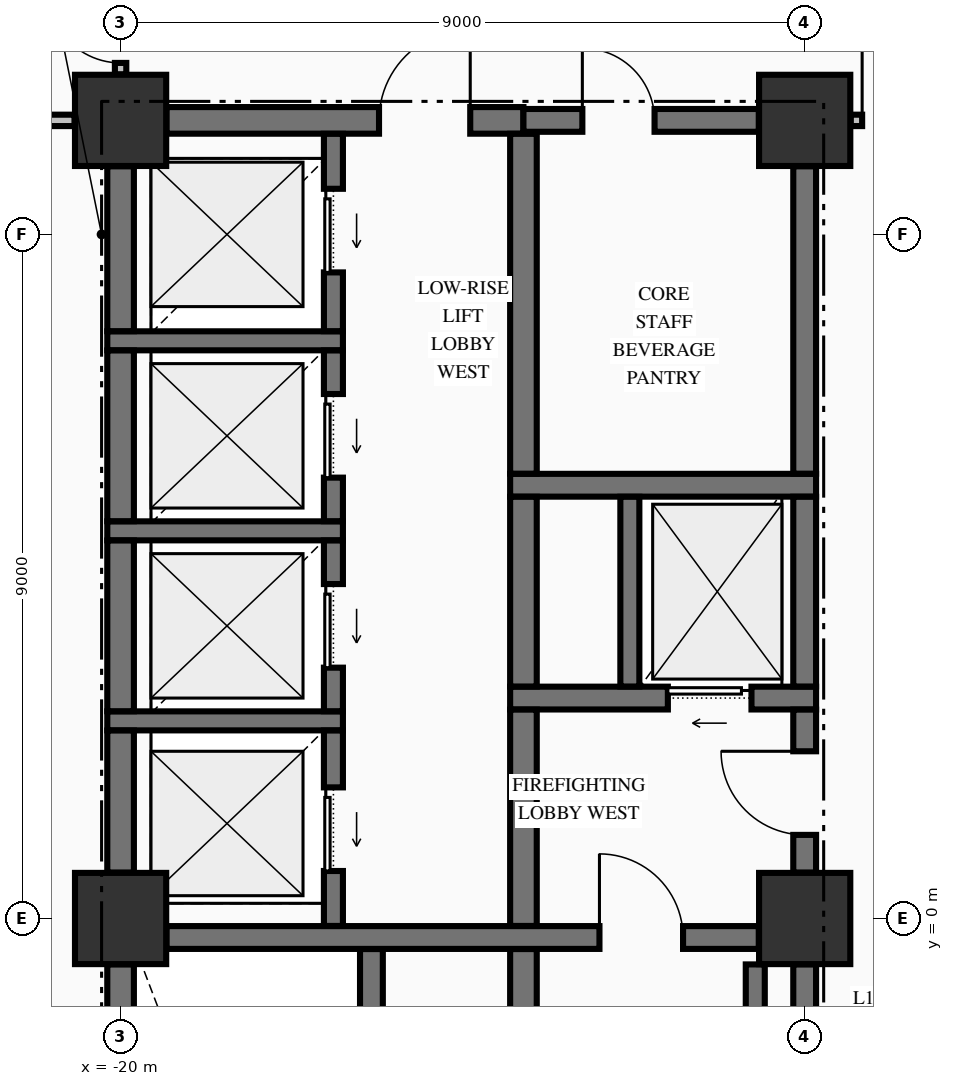
"""IFC4 building model, lengths in metres.
Left out: names, types, materials, properties, quantities, classifications, styles, units other than length and angle.
Written with IfcOpenShell. Run it as: python <this file> out.ifc"""

import sys

from ifc_helpers import new_model, si_unit, direction, frame, frame_2d, origin, origin_2d, place, context, subcontext, project, spatial, rectangle, extrude, element, fill, save


model = new_model("IFC4")
c1 = context("Model", 3, precision=1e-05, world=origin(), true_north=direction((0.0, 1.0)))
c2 = subcontext(c1, "Body", "Model", "MODEL_VIEW")
j1 = project(units=[si_unit("LENGTHUNIT", "METRE"), si_unit("PLANEANGLEUNIT", "RADIAN")], contexts=[c1])
p1 = place(None, origin())
s1 = spatial("IfcSite", under=j1, at=p1, CompositionType="ELEMENT")
p2 = place(p1, origin())
s2 = spatial("IfcBuilding", under=s1, at=p2, CompositionType="ELEMENT")
p3 = place(p2, frame((0.0, 0.0, 75.04)))
s3 = spatial("IfcBuildingStorey", under=s2, at=p3, CompositionType="ELEMENT", Elevation=75.04)
for number, where, z_axis, x_axis in (
    (1, (-20.0, 10.5, -0.25), (0.0, 0.0, 1.0), (1.0, 0.0, 0.0)),
    (2, (-11.0, 0.0, -0.25), (0.0, 0.0, 1.0), (1.0, 0.0, 0.0)),
    (3, (-11.0, 10.5, -0.25), (0.0, 0.0, 1.0), (1.0, 0.0, 0.0)),
    (4, (-20.0, 0.0, -0.25), (0.0, 0.0, 1.0), (1.0, 0.0, 0.0)),
):
    element("IfcColumn", number, at=place(p3, frame(where, z_axis=z_axis, x_axis=x_axis)), inside=s3, PredefinedType="COLUMN", context=c2, shape_type="SweptSolid", body=[
        extrude(rectangle(XDim=1.2, YDim=1.2, at=origin_2d()), origin(), (0.0, 0.0, 1.0), 3.57),
    ])
p4 = place(p3, frame((-19.396, -0.25, 0.0), z_axis=(0.0, 0.0, 1.0), x_axis=(1.0, 0.0, 0.0)))
e5 = element("IfcWall", 5, at=p4, inside=s3, PredefinedType="SHEAR", context=c2, shape_type="SweptSolid", body=[
    extrude(rectangle(XDim=7.792, YDim=0.3, at=frame_2d((3.896, 0.0))), origin(), (0.0, 0.0, 1.0), 3.32),
])
p5 = place(p4, frame((5.696, 0.0, 0.0)))
e6 = element("IfcOpeningElement", 6, at=p5, cuts=e5, PredefinedType="OPENING", context=c2, shape_type="SweptSolid", body=[
    extrude(rectangle(XDim=1.1, YDim=2.15, at=frame_2d((0.55, 1.075))), frame((0.0, 0.16, 0.0), z_axis=(0.0, -1.0, 0.0), x_axis=(1.0, 0.0, 0.0)), (0.0, 0.0, 1.0), 0.32),
])
p6 = place(p3, frame((-20.175, 2.6, 0.0), z_axis=(0.0, 0.0, 1.0), x_axis=(1.0, 0.0, 0.0)))
e7 = element("IfcWall", 7, at=p6, inside=s3, PredefinedType="SOLIDWALL", context=c2, shape_type="SweptSolid", body=[
    extrude(rectangle(XDim=3.1, YDim=0.25, at=frame_2d((1.55, 0.0))), origin(), (0.0, 0.0, 1.0), 3.32),
])
p7 = place(p3, frame((-14.875, 2.9, 0.0), z_axis=(0.0, 0.0, 1.0), x_axis=(1.0, 0.0, 0.0)))
e8 = element("IfcWall", 8, at=p7, inside=s3, PredefinedType="SHEAR", context=c2, shape_type="SweptSolid", body=[
    extrude(rectangle(XDim=4.025, YDim=0.3, at=frame_2d((2.012, 0.0))), origin(), (0.0, 0.0, 1.0), 3.32),
])
p8 = place(p7, frame((2.075, 0.0, 0.0)))
e9 = element("IfcOpeningElement", 9, at=p8, cuts=e8, PredefinedType="OPENING", context=c2, shape_type="SweptSolid", body=[
    extrude(rectangle(XDim=1.1, YDim=2.2, at=frame_2d((0.55, 1.1))), frame((0.0, 0.16, 0.0), z_axis=(0.0, -1.0, 0.0), x_axis=(1.0, 0.0, 0.0)), (0.0, 0.0, 1.0), 0.32),
])
p9 = place(p3, frame((-20.175, 5.1, 0.0), z_axis=(0.0, 0.0, 1.0), x_axis=(1.0, 0.0, 0.0)))
e10 = element("IfcWall", 10, at=p9, inside=s3, PredefinedType="SOLIDWALL", context=c2, shape_type="SweptSolid", body=[
    extrude(rectangle(XDim=3.1, YDim=0.25, at=frame_2d((1.55, 0.0))), origin(), (0.0, 0.0, 1.0), 3.32),
])
p10 = place(p3, frame((-14.875, 5.7, 0.0), z_axis=(0.0, 0.0, 1.0), x_axis=(1.0, 0.0, 0.0)))
e11 = element("IfcWall", 11, at=p10, inside=s3, PredefinedType="SHEAR", context=c2, shape_type="SweptSolid", body=[
    extrude(rectangle(XDim=4.025, YDim=0.3, at=frame_2d((2.012, 0.0))), origin(), (0.0, 0.0, 1.0), 3.32),
])
p11 = place(p3, frame((-20.175, 7.6, 0.0), z_axis=(0.0, 0.0, 1.0), x_axis=(1.0, 0.0, 0.0)))
e12 = element("IfcWall", 12, at=p11, inside=s3, PredefinedType="SOLIDWALL", context=c2, shape_type="SweptSolid", body=[
    extrude(rectangle(XDim=3.1, YDim=0.25, at=frame_2d((1.55, 0.0))), origin(), (0.0, 0.0, 1.0), 3.32),
])
p12 = place(p3, frame((-19.396, 10.5, 0.0), z_axis=(0.0, 0.0, 1.0), x_axis=(1.0, 0.0, 0.0)))
e13 = element("IfcWall", 13, at=p12, inside=s3, PredefinedType="SHEAR", context=c2, shape_type="SweptSolid", body=[
    extrude(rectangle(XDim=4.696, YDim=0.35, at=frame_2d((2.348, 0.0))), origin(), (0.0, 0.0, 1.0), 3.32),
])
p13 = place(p12, frame((2.796, 0.0, 0.0)))
e14 = element("IfcOpeningElement", 14, at=p13, cuts=e13, PredefinedType="OPENING", context=c2, shape_type="SweptSolid", body=[
    extrude(rectangle(XDim=1.2, YDim=2.15, at=frame_2d((0.6, 1.075))), frame((0.0, 0.185, 0.0), z_axis=(0.0, -1.0, 0.0), x_axis=(1.0, 0.0, 0.0)), (0.0, 0.0, 1.0), 0.37),
])
p14 = place(p3, frame((-14.7, 10.5, 0.0), z_axis=(0.0, 0.0, 1.0), x_axis=(1.0, 0.0, 0.0)))
e15 = element("IfcWall", 15, at=p14, inside=s3, PredefinedType="SHEAR", context=c2, shape_type="SweptSolid", body=[
    extrude(rectangle(XDim=3.096, YDim=0.3, at=frame_2d((1.548, 0.0))), origin(), (0.0, 0.0, 1.0), 3.32),
])
p15 = place(p14, frame((0.775, 0.0, 0.0)))
e16 = element("IfcOpeningElement", 16, at=p15, cuts=e15, PredefinedType="OPENING", context=c2, shape_type="SweptSolid", body=[
    extrude(rectangle(XDim=0.95, YDim=2.15, at=frame_2d((0.475, 1.075))), frame((0.0, 0.16, 0.0), z_axis=(0.0, -1.0, 0.0), x_axis=(1.0, 0.0, 0.0)), (0.0, 0.0, 1.0), 0.32),
])
p16 = place(p3, frame((-28.835, 10.5, 0.0), z_axis=(0.0, 0.0, 1.0), x_axis=(1.0, 0.0, 0.0)))
e17 = element("IfcWall", 17, at=p16, inside=s3, PredefinedType="PARTITIONING", context=c2, shape_type="SweptSolid", body=[
    extrude(rectangle(XDim=8.229, YDim=0.15, at=frame_2d((4.115, 0.0))), origin(), (0.0, 0.0, 1.0), 3.32),
])
p17 = place(p16, frame((3.835, 0.0, 0.0)))
e18 = element("IfcOpeningElement", 18, at=p17, cuts=e17, PredefinedType="OPENING", context=c2, shape_type="SweptSolid", body=[
    extrude(rectangle(XDim=1.0, YDim=2.15, at=frame_2d((0.5, 1.075))), frame((0.0, 0.085, 0.0), z_axis=(0.0, -1.0, 0.0), x_axis=(1.0, 0.0, 0.0)), (0.0, 0.0, 1.0), 0.17),
])
p18 = place(p3, frame((-10.394, 10.5, 0.0), z_axis=(0.0, 0.0, 1.0), x_axis=(1.0, 0.0, 0.0)))
e19 = element("IfcWall", 19, at=p18, inside=s3, PredefinedType="PARTITIONING", context=c2, shape_type="SweptSolid", body=[
    extrude(rectangle(XDim=20.788, YDim=0.15, at=frame_2d((10.394, 0.0))), origin(), (0.0, 0.0, 1.0), 3.32),
])
p19 = place(p18, frame((0.15, 0.0, 0.0)))
e20 = element("IfcOpeningElement", 20, at=p19, cuts=e19, PredefinedType="OPENING", context=c2, shape_type="SweptSolid", body=[
    extrude(rectangle(XDim=1.05, YDim=2.15, at=frame_2d((0.525, 1.075))), frame((0.0, 0.085, 0.0), z_axis=(0.0, -1.0, 0.0), x_axis=(1.0, 0.0, 0.0)), (0.0, 0.0, 1.0), 0.17),
])
p20 = place(p18, frame((19.588, 0.0, 0.0)))
e21 = element("IfcOpeningElement", 21, at=p20, cuts=e19, PredefinedType="OPENING", context=c2, shape_type="SweptSolid", body=[
    extrude(rectangle(XDim=1.05, YDim=2.15, at=frame_2d((0.525, 1.075))), frame((0.0, 0.085, 0.0), z_axis=(0.0, -1.0, 0.0), x_axis=(1.0, 0.0, 0.0)), (0.0, 0.0, 1.0), 0.17),
])
p21 = place(p3, frame((-20.0, -9.346, 0.0), z_axis=(0.0, 0.0, 1.0), x_axis=(0.0, 1.0, 0.0)))
e22 = element("IfcWall", 22, at=p21, inside=s3, PredefinedType="SHEAR", context=c2, shape_type="SweptSolid", body=[
    extrude(rectangle(XDim=8.742, YDim=0.35, at=frame_2d((4.371, 0.0))), origin(), (0.0, 0.0, 1.0), 3.32),
])
p22 = place(p3, frame((-20.0, 0.604, 0.0), z_axis=(0.0, 0.0, 1.0), x_axis=(0.0, 1.0, 0.0)))
e23 = element("IfcWall", 23, at=p22, inside=s3, PredefinedType="SHEAR", context=c2, shape_type="SweptSolid", body=[
    extrude(rectangle(XDim=1.869, YDim=0.35, at=frame_2d((0.935, 0.0))), origin(), (0.0, 0.0, 1.0), 3.32),
])
for number, where, z_axis, x_axis in (
    (24, (-20.0, 2.727, 0.0), (0.0, 0.0, 1.0), (0.0, 1.0, 0.0)),
    (25, (-20.0, 5.227, 0.0), (0.0, 0.0, 1.0), (0.0, 1.0, 0.0)),
):
    element("IfcWall", number, at=place(p3, frame(where, z_axis=z_axis, x_axis=x_axis)), inside=s3, PredefinedType="SHEAR", context=c2, shape_type="SweptSolid", body=[
        extrude(rectangle(XDim=2.246, YDim=0.35, at=frame_2d((1.123, 0.0))), origin(), (0.0, 0.0, 1.0), 3.32),
    ])
p23 = place(p3, frame((-20.0, 7.727, 0.0), z_axis=(0.0, 0.0, 1.0), x_axis=(0.0, 1.0, 0.0)))
e26 = element("IfcWall", 26, at=p23, inside=s3, PredefinedType="SHEAR", context=c2, shape_type="SweptSolid", body=[
    extrude(rectangle(XDim=2.169, YDim=0.35, at=frame_2d((1.084, 0.0))), origin(), (0.0, 0.0, 1.0), 3.32),
])
p24 = place(p3, frame((-17.2, -0.098, 0.0), z_axis=(0.0, 0.0, 1.0), x_axis=(0.0, 1.0, 0.0)))
e27 = element("IfcWall", 27, at=p24, inside=s3, PredefinedType="SOLIDWALL", context=c2, shape_type="SweptSolid", body=[
    extrude(rectangle(XDim=2.571, YDim=0.25, at=frame_2d((1.285, 0.0))), origin(), (0.0, 0.0, 1.0), 3.32),
])
p25 = place(p24, frame((0.723, 0.0, 0.0)))
e28 = element("IfcOpeningElement", 28, at=p25, cuts=e27, PredefinedType="OPENING", context=c2, shape_type="SweptSolid", body=[
    extrude(rectangle(XDim=1.1, YDim=2.2, at=frame_2d((0.55, 1.1))), frame((0.0, 0.135, 0.0), z_axis=(0.0, -1.0, 0.0), x_axis=(1.0, 0.0, 0.0)), (0.0, 0.0, 1.0), 0.27),
])
p26 = place(p3, frame((-17.2, 2.727, 0.0), z_axis=(0.0, 0.0, 1.0), x_axis=(0.0, 1.0, 0.0)))
e29 = element("IfcWall", 29, at=p26, inside=s3, PredefinedType="SOLIDWALL", context=c2, shape_type="SweptSolid", body=[
    extrude(rectangle(XDim=2.246, YDim=0.25, at=frame_2d((1.123, 0.0))), origin(), (0.0, 0.0, 1.0), 3.32),
])
p27 = place(p26, frame((0.573, 0.0, 0.0)))
e30 = element("IfcOpeningElement", 30, at=p27, cuts=e29, PredefinedType="OPENING", context=c2, shape_type="SweptSolid", body=[
    extrude(rectangle(XDim=1.1, YDim=2.2, at=frame_2d((0.55, 1.1))), frame((0.0, 0.135, 0.0), z_axis=(0.0, -1.0, 0.0), x_axis=(1.0, 0.0, 0.0)), (0.0, 0.0, 1.0), 0.27),
])
p28 = place(p3, frame((-17.2, 5.227, 0.0), z_axis=(0.0, 0.0, 1.0), x_axis=(0.0, 1.0, 0.0)))
e31 = element("IfcWall", 31, at=p28, inside=s3, PredefinedType="SOLIDWALL", context=c2, shape_type="SweptSolid", body=[
    extrude(rectangle(XDim=2.246, YDim=0.25, at=frame_2d((1.123, 0.0))), origin(), (0.0, 0.0, 1.0), 3.32),
])
p29 = place(p28, frame((0.573, 0.0, 0.0)))
e32 = element("IfcOpeningElement", 32, at=p29, cuts=e31, PredefinedType="OPENING", context=c2, shape_type="SweptSolid", body=[
    extrude(rectangle(XDim=1.1, YDim=2.2, at=frame_2d((0.55, 1.1))), frame((0.0, 0.135, 0.0), z_axis=(0.0, -1.0, 0.0), x_axis=(1.0, 0.0, 0.0)), (0.0, 0.0, 1.0), 0.27),
])
p30 = place(p3, frame((-17.2, 7.727, 0.0), z_axis=(0.0, 0.0, 1.0), x_axis=(0.0, 1.0, 0.0)))
e33 = element("IfcWall", 33, at=p30, inside=s3, PredefinedType="SOLIDWALL", context=c2, shape_type="SweptSolid", body=[
    extrude(rectangle(XDim=2.596, YDim=0.25, at=frame_2d((1.298, 0.0))), origin(), (0.0, 0.0, 1.0), 3.32),
])
p31 = place(p30, frame((0.773, 0.0, 0.0)))
e34 = element("IfcOpeningElement", 34, at=p31, cuts=e33, PredefinedType="OPENING", context=c2, shape_type="SweptSolid", body=[
    extrude(rectangle(XDim=1.1, YDim=2.2, at=frame_2d((0.55, 1.1))), frame((0.0, 0.135, 0.0), z_axis=(0.0, -1.0, 0.0), x_axis=(1.0, 0.0, 0.0)), (0.0, 0.0, 1.0), 0.27),
])
p32 = place(p3, frame((-16.7, -9.773, 0.0), z_axis=(0.0, 0.0, 1.0), x_axis=(0.0, 1.0, 0.0)))
e35 = element("IfcWall", 35, at=p32, inside=s3, PredefinedType="SHEAR", context=c2, shape_type="SweptSolid", body=[
    extrude(rectangle(XDim=9.371, YDim=0.3, at=frame_2d((4.686, 0.0))), origin(), (0.0, 0.0, 1.0), 3.32),
])
p33 = place(p3, frame((-14.7, -9.773, 0.0), z_axis=(0.0, 0.0, 1.0), x_axis=(0.0, 1.0, 0.0)))
e36 = element("IfcWall", 36, at=p33, inside=s3, PredefinedType="SHEAR", context=c2, shape_type="SweptSolid", body=[
    extrude(rectangle(XDim=9.371, YDim=0.35, at=frame_2d((4.686, 0.0))), origin(), (0.0, 0.0, 1.0), 3.32),
])
p34 = place(p3, frame((-14.7, -0.098, 0.0), z_axis=(0.0, 0.0, 1.0), x_axis=(0.0, 1.0, 0.0)))
e37 = element("IfcWall", 37, at=p34, inside=s3, PredefinedType="SHEAR", context=c2, shape_type="SweptSolid", body=[
    extrude(rectangle(XDim=2.846, YDim=0.35, at=frame_2d((1.423, 0.0))), origin(), (0.0, 0.0, 1.0), 3.32),
])
p35 = place(p3, frame((-14.7, 3.052, 0.0), z_axis=(0.0, 0.0, 1.0), x_axis=(0.0, 1.0, 0.0)))
e38 = element("IfcWall", 38, at=p35, inside=s3, PredefinedType="SHEAR", context=c2, shape_type="SweptSolid", body=[
    extrude(rectangle(XDim=2.496, YDim=0.35, at=frame_2d((1.248, 0.0))), origin(), (0.0, 0.0, 1.0), 3.32),
])
p36 = place(p3, frame((-14.7, 5.852, 0.0), z_axis=(0.0, 0.0, 1.0), x_axis=(0.0, 1.0, 0.0)))
e39 = element("IfcWall", 39, at=p36, inside=s3, PredefinedType="SHEAR", context=c2, shape_type="SweptSolid", body=[
    extrude(rectangle(XDim=4.471, YDim=0.35, at=frame_2d((2.235, 0.0))), origin(), (0.0, 0.0, 1.0), 3.32),
])
p37 = place(p3, frame((-13.3, 3.052, 0.0), z_axis=(0.0, 0.0, 1.0), x_axis=(0.0, 1.0, 0.0)))
e40 = element("IfcWall", 40, at=p37, inside=s3, PredefinedType="SOLIDWALL", context=c2, shape_type="SweptSolid", body=[
    extrude(rectangle(XDim=2.496, YDim=0.25, at=frame_2d((1.248, 0.0))), origin(), (0.0, 0.0, 1.0), 3.32),
])
p38 = place(p3, frame((-11.65, -9.346, 0.0), z_axis=(0.0, 0.0, 1.0), x_axis=(0.0, 1.0, 0.0)))
e41 = element("IfcWall", 41, at=p38, inside=s3, PredefinedType="SOLIDWALL", context=c2, shape_type="SweptSolid", body=[
    extrude(rectangle(XDim=8.742, YDim=0.25, at=frame_2d((4.371, 0.0))), origin(), (0.0, 0.0, 1.0), 3.32),
])
p39 = place(p3, frame((-11.0, -9.346, 0.0), z_axis=(0.0, 0.0, 1.0), x_axis=(0.0, 1.0, 0.0)))
e42 = element("IfcWall", 42, at=p39, inside=s3, PredefinedType="SHEAR", context=c2, shape_type="SweptSolid", body=[
    extrude(rectangle(XDim=8.742, YDim=0.3, at=frame_2d((4.371, 0.0))), origin(), (0.0, 0.0, 1.0), 3.32),
])
p40 = place(p3, frame((-11.0, 0.604, 0.0), z_axis=(0.0, 0.0, 1.0), x_axis=(0.0, 1.0, 0.0)))
e43 = element("IfcWall", 43, at=p40, inside=s3, PredefinedType="SHEAR", context=c2, shape_type="SweptSolid", body=[
    extrude(rectangle(XDim=2.144, YDim=0.3, at=frame_2d((1.072, 0.0))), origin(), (0.0, 0.0, 1.0), 3.32),
])
p41 = place(p40, frame((0.496, 0.0, 0.0)))
e44 = element("IfcOpeningElement", 44, at=p41, cuts=e43, PredefinedType="OPENING", context=c2, shape_type="SweptSolid", body=[
    extrude(rectangle(XDim=1.1, YDim=2.15, at=frame_2d((0.55, 1.075))), frame((0.0, 0.16, 0.0), z_axis=(0.0, -1.0, 0.0), x_axis=(1.0, 0.0, 0.0)), (0.0, 0.0, 1.0), 0.32),
])
p42 = place(p3, frame((-11.0, 3.052, 0.0), z_axis=(0.0, 0.0, 1.0), x_axis=(0.0, 1.0, 0.0)))
e45 = element("IfcWall", 45, at=p42, inside=s3, PredefinedType="SHEAR", context=c2, shape_type="SweptSolid", body=[
    extrude(rectangle(XDim=2.496, YDim=0.3, at=frame_2d((1.248, 0.0))), origin(), (0.0, 0.0, 1.0), 3.32),
])
p43 = place(p3, frame((-11.0, 5.852, 0.0), z_axis=(0.0, 0.0, 1.0), x_axis=(0.0, 1.0, 0.0)))
e46 = element("IfcWall", 46, at=p43, inside=s3, PredefinedType="SHEAR", context=c2, shape_type="SweptSolid", body=[
    extrude(rectangle(XDim=4.044, YDim=0.3, at=frame_2d((2.022, 0.0))), origin(), (0.0, 0.0, 1.0), 3.32),
])
p44 = place(p3, frame((-20.0, 11.106, 0.0), z_axis=(0.0, 0.0, 1.0), x_axis=(0.0, 1.0, 0.0)))
e47 = element("IfcWall", 47, at=p44, inside=s3, PredefinedType="PARTITIONING", context=c2, shape_type="SweptSolid", body=[
    extrude(rectangle(XDim=1.366, YDim=0.15, at=frame_2d((0.683, 0.0))), origin(), (0.0, 0.0, 1.0), 2.66),
])
p45 = place(p44, frame((0.15, 0.0, 0.0)))
e48 = element("IfcOpeningElement", 48, at=p45, cuts=e47, PredefinedType="OPENING", context=c2, shape_type="SweptSolid", body=[
    extrude(rectangle(XDim=0.95, YDim=2.15, at=frame_2d((0.475, 1.075))), frame((0.0, 0.085, 0.0), z_axis=(0.0, -1.0, 0.0), x_axis=(1.0, 0.0, 0.0)), (0.0, 0.0, 1.0), 0.17),
])
p46 = place(p5, origin())
e49 = element("IfcDoor", 49, at=p46, inside=s3, OperationType="SINGLE_SWING_LEFT", PredefinedType="DOOR", context=c2, shape_type="SweptSolid", body=[
    extrude(rectangle(XDim=1.1, YDim=2.15, at=frame_2d((0.55, 1.075))), frame((0.0, 0.025, 0.0), z_axis=(0.0, -1.0, 0.0), x_axis=(1.0, 0.0, 0.0)), (0.0, 0.0, 1.0), 0.05),
])
fill(e6, e49)
p47 = place(p41, origin())
e50 = element("IfcDoor", 50, at=p47, inside=s3, OperationType="SINGLE_SWING_RIGHT", PredefinedType="DOOR", context=c2, shape_type="SweptSolid", body=[
    extrude(rectangle(XDim=1.1, YDim=2.15, at=frame_2d((0.55, 1.075))), frame((0.0, 0.025, 0.0), z_axis=(0.0, -1.0, 0.0), x_axis=(1.0, 0.0, 0.0)), (0.0, 0.0, 1.0), 0.05),
])
fill(e44, e50)
p48 = place(p8, origin())
e51 = element("IfcDoor", 51, at=p48, inside=s3, OperationType="SLIDING_TO_LEFT", PredefinedType="DOOR", context=c2, shape_type="SweptSolid", body=[
    extrude(rectangle(XDim=1.1, YDim=2.2, at=frame_2d((0.55, 1.1))), frame((0.0, 0.025, 0.0), z_axis=(0.0, -1.0, 0.0), x_axis=(1.0, 0.0, 0.0)), (0.0, 0.0, 1.0), 0.05),
])
fill(e9, e51)
p49 = place(p15, origin())
e52 = element("IfcDoor", 52, at=p49, inside=s3, OperationType="SINGLE_SWING_LEFT", PredefinedType="DOOR", context=c2, shape_type="SweptSolid", body=[
    extrude(rectangle(XDim=0.95, YDim=2.15, at=frame_2d((0.475, 1.075))), frame((0.0, 0.025, 0.0), z_axis=(0.0, -1.0, 0.0), x_axis=(1.0, 0.0, 0.0)), (0.0, 0.0, 1.0), 0.05),
])
fill(e16, e52)
p50 = place(p13, origin())
e53 = element("IfcDoor", 53, at=p50, inside=s3, OperationType="SINGLE_SWING_RIGHT", PredefinedType="DOOR", context=c2, shape_type="SweptSolid", body=[
    extrude(rectangle(XDim=1.2, YDim=2.15, at=frame_2d((0.6, 1.075))), frame((0.0, 0.025, 0.0), z_axis=(0.0, -1.0, 0.0), x_axis=(1.0, 0.0, 0.0)), (0.0, 0.0, 1.0), 0.05),
])
fill(e14, e53)
p51 = place(p25, origin())
e54 = element("IfcDoor", 54, at=p51, inside=s3, OperationType="SLIDING_TO_LEFT", PredefinedType="DOOR", context=c2, shape_type="SweptSolid", body=[
    extrude(rectangle(XDim=1.1, YDim=2.2, at=frame_2d((0.55, 1.1))), frame((0.0, 0.025, 0.0), z_axis=(0.0, -1.0, 0.0), x_axis=(1.0, 0.0, 0.0)), (0.0, 0.0, 1.0), 0.05),
])
fill(e28, e54)
p52 = place(p27, origin())
e55 = element("IfcDoor", 55, at=p52, inside=s3, OperationType="SLIDING_TO_LEFT", PredefinedType="DOOR", context=c2, shape_type="SweptSolid", body=[
    extrude(rectangle(XDim=1.1, YDim=2.2, at=frame_2d((0.55, 1.1))), frame((0.0, 0.025, 0.0), z_axis=(0.0, -1.0, 0.0), x_axis=(1.0, 0.0, 0.0)), (0.0, 0.0, 1.0), 0.05),
])
fill(e30, e55)
p53 = place(p29, origin())
e56 = element("IfcDoor", 56, at=p53, inside=s3, OperationType="SLIDING_TO_LEFT", PredefinedType="DOOR", context=c2, shape_type="SweptSolid", body=[
    extrude(rectangle(XDim=1.1, YDim=2.2, at=frame_2d((0.55, 1.1))), frame((0.0, 0.025, 0.0), z_axis=(0.0, -1.0, 0.0), x_axis=(1.0, 0.0, 0.0)), (0.0, 0.0, 1.0), 0.05),
])
fill(e32, e56)
p54 = place(p31, origin())
e57 = element("IfcDoor", 57, at=p54, inside=s3, OperationType="SLIDING_TO_LEFT", PredefinedType="DOOR", context=c2, shape_type="SweptSolid", body=[
    extrude(rectangle(XDim=1.1, YDim=2.2, at=frame_2d((0.55, 1.1))), frame((0.0, 0.025, 0.0), z_axis=(0.0, -1.0, 0.0), x_axis=(1.0, 0.0, 0.0)), (0.0, 0.0, 1.0), 0.05),
])
fill(e34, e57)
p55 = place(p19, origin())
e58 = element("IfcDoor", 58, at=p55, inside=s3, OperationType="SINGLE_SWING_LEFT", PredefinedType="DOOR", context=c2, shape_type="SweptSolid", body=[
    extrude(rectangle(XDim=1.05, YDim=2.15, at=frame_2d((0.525, 1.075))), frame((0.0, 0.025, 0.0), z_axis=(0.0, -1.0, 0.0), x_axis=(1.0, 0.0, 0.0)), (0.0, 0.0, 1.0), 0.05),
])
fill(e20, e58)
p56 = place(p45, origin())
e59 = element("IfcDoor", 59, at=p56, inside=s3, OperationType="SINGLE_SWING_RIGHT", PredefinedType="DOOR", context=c2, shape_type="SweptSolid", body=[
    extrude(rectangle(XDim=0.95, YDim=2.15, at=frame_2d((0.475, 1.075))), frame((0.0, 0.025, 0.0), z_axis=(0.0, -1.0, 0.0), x_axis=(1.0, 0.0, 0.0)), (0.0, 0.0, 1.0), 0.05),
])
fill(e48, e59)
save(model, sys.argv[1])
